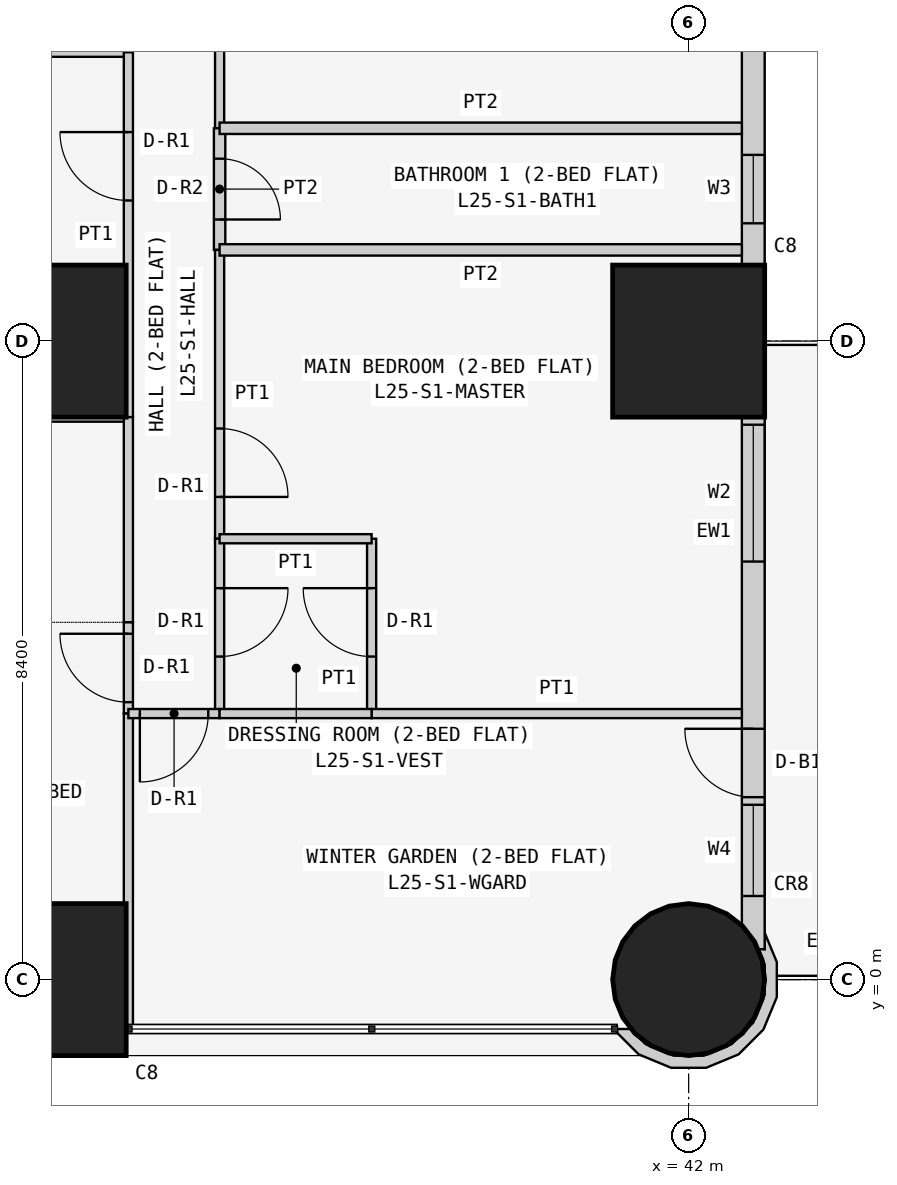
"""IFC4 building model, lengths in metres.
Left out: names, types, materials, properties, quantities, classifications, styles, units other than length and angle.
Written with IfcOpenShell. Run it as: python <this file> out.ifc"""

import sys

from ifc_helpers import new_model, si_unit, direction, frame, frame_2d, origin, origin_2d, place, context, subcontext, project, spatial, polyline, rectangle, circle, outline, extrude, element, fill, save


model = new_model("IFC4")
c1 = context("Model", 3, precision=1e-05, world=origin(), true_north=direction((0.0, 1.0)))
c2 = subcontext(c1, "Body", "Model", "MODEL_VIEW")
j1 = project(units=[si_unit("LENGTHUNIT", "METRE"), si_unit("PLANEANGLEUNIT", "RADIAN")], contexts=[c1])
p1 = place(None, origin())
s1 = spatial("IfcSite", under=j1, at=p1, CompositionType="ELEMENT")
p2 = place(p1, origin())
s2 = spatial("IfcBuilding", under=s1, at=p2, CompositionType="ELEMENT")
p3 = place(p2, frame((0.0, 0.0, 99.3)))
s3 = spatial("IfcBuildingStorey", under=s2, at=p3, CompositionType="ELEMENT", Elevation=99.3)
for number, where, z_axis, x_axis in (
    (1, (33.6, 0.0, 0.0), (0.0, 0.0, 1.0), (1.0, 0.0, 0.0)),
    (2, (33.6, 8.4, 0.0), (0.0, 0.0, 1.0), (1.0, 0.0, 0.0)),
):
    element("IfcColumn", number, at=place(p3, frame(where, z_axis=z_axis, x_axis=x_axis)), inside=s3, PredefinedType="COLUMN", context=c2, shape_type="SweptSolid", body=[
        extrude(rectangle(XDim=2.0, YDim=2.0, at=origin_2d()), origin(), (0.0, 0.0, 1.0), 3.6),
    ])
p4 = place(p3, frame((42.0, 0.0, 0.0), z_axis=(0.0, 0.0, 1.0), x_axis=(1.0, 0.0, 0.0)))
e3 = element("IfcColumn", 3, at=p4, inside=s3, PredefinedType="COLUMN", context=c2, shape_type="SweptSolid", body=[
    extrude(circle(Radius=1.0, at=origin_2d()), origin(), (0.0, 0.0, 1.0), 3.6),
])
p5 = place(p3, frame((42.0, 8.4, 0.0), z_axis=(0.0, 0.0, 1.0), x_axis=(1.0, 0.0, 0.0)))
e4 = element("IfcColumn", 4, at=p5, inside=s3, PredefinedType="COLUMN", context=c2, shape_type="SweptSolid", body=[
    extrude(rectangle(XDim=2.0, YDim=2.0, at=origin_2d()), origin(), (0.0, 0.0, 1.0), 3.6),
])
p6 = place(p3, frame((42.85, 0.4, 0.0), z_axis=(0.0, 0.0, 1.0), x_axis=(0.0, 1.0, 0.0)))
e5 = element("IfcWall", 5, at=p6, inside=s3, PredefinedType="SOLIDWALL", context=c2, shape_type="SweptSolid", body=[
    extrude(rectangle(XDim=15.7, YDim=0.3, at=frame_2d((7.85, 0.0))), origin(), (0.0, 0.0, 1.0), 3.35),
])
p7 = place(p6, frame((12.4, 0.0, 0.9)))
e6 = element("IfcOpeningElement", 6, at=p7, cuts=e5, PredefinedType="OPENING", context=c2, shape_type="SweptSolid", body=[
    extrude(rectangle(XDim=1.8, YDim=1.5, at=frame_2d((0.9, 0.75))), frame((0.0, 0.16, 0.0), z_axis=(0.0, -1.0, 0.0), x_axis=(1.0, 0.0, 0.0)), (0.0, 0.0, 1.0), 0.32),
])
p8 = place(p6, frame((9.55, 0.0, 1.5)))
e7 = element("IfcOpeningElement", 7, at=p8, cuts=e5, PredefinedType="OPENING", context=c2, shape_type="SweptSolid", body=[
    extrude(rectangle(XDim=0.9, YDim=0.7, at=frame_2d((0.45, 0.35))), frame((0.0, 0.16, 0.0), z_axis=(0.0, -1.0, 0.0), x_axis=(1.0, 0.0, 0.0)), (0.0, 0.0, 1.0), 0.32),
])
p9 = place(p6, frame((5.1, 0.0, 0.9)))
e8 = element("IfcOpeningElement", 8, at=p9, cuts=e5, PredefinedType="OPENING", context=c2, shape_type="SweptSolid", body=[
    extrude(rectangle(XDim=1.8, YDim=1.5, at=frame_2d((0.9, 0.75))), frame((0.0, 0.16, 0.0), z_axis=(0.0, -1.0, 0.0), x_axis=(1.0, 0.0, 0.0)), (0.0, 0.0, 1.0), 0.32),
])
p10 = place(p6, frame((2.0, 0.0, 0.0)))
e9 = element("IfcOpeningElement", 9, at=p10, cuts=e5, PredefinedType="OPENING", context=c2, shape_type="SweptSolid", body=[
    extrude(rectangle(XDim=0.9, YDim=2.4, at=frame_2d((0.45, 1.2))), frame((0.0, 0.16, 0.0), z_axis=(0.0, -1.0, 0.0), x_axis=(1.0, 0.0, 0.0)), (0.0, 0.0, 1.0), 0.32),
])
p11 = place(p6, frame((0.7, 0.0, 0.9)))
e10 = element("IfcOpeningElement", 10, at=p11, cuts=e5, PredefinedType="OPENING", context=c2, shape_type="SweptSolid", body=[
    extrude(rectangle(XDim=1.2, YDim=1.5, at=frame_2d((0.6, 0.75))), frame((0.0, 0.16, 0.0), z_axis=(0.0, -1.0, 0.0), x_axis=(1.0, 0.0, 0.0)), (0.0, 0.0, 1.0), 0.32),
])
p12 = place(p3, frame((41.132, -0.643, 0.0), z_axis=(0.0, 0.0, 1.0), x_axis=(0.555974394895, -0.831199417842, 0.0)))
e11 = element("IfcWall", 11, at=p12, inside=s3, PredefinedType="SOLIDWALL", context=c2, shape_type="SweptSolid", body=[
    extrude(outline(polyline([(0.171, 2.132), (0.113, 2.066), (0.339, 2.022), (0.67, 1.8), (0.891, 1.469), (0.968, 1.078), (0.89, 0.688), (0.669, 0.357), (0.338, 0.136), (0.062, 0.081), (-0.036, -0.066), (0.005, -0.093), (0.4, -0.014), (0.783, 0.242), (1.04, 0.626), (1.13, 1.078), (1.04, 1.531), (0.784, 1.915), (0.401, 2.171), (-0.009, 2.253), (0.171, 2.132)])), origin(), (0.0, 0.0, 1.0), 3.35),
])
for number, where, z_axis, x_axis in (
    (12, (29.4, 12.2, 0.0), (0.0, 0.0, 1.0), (1.0, 0.0, 0.0)),
    (13, (29.4, 7.4, 0.0), (0.0, 0.0, 1.0), (1.0, 0.0, 0.0)),
):
    element("IfcWall", number, at=place(p3, frame(where, z_axis=z_axis, x_axis=x_axis)), inside=s3, PredefinedType="PARTITIONING", context=c2, shape_type="SweptSolid", body=[
        extrude(rectangle(XDim=5.229, YDim=0.12, at=frame_2d((2.615, 0.0))), origin(), (0.0, 0.0, 1.0), 3.35),
    ])
p13 = place(p3, frame((34.629, 7.4, 0.0), z_axis=(0.0, 0.0, 1.0), x_axis=(0.0, 1.0, 0.0)))
e14 = element("IfcWall", 14, at=p13, inside=s3, PredefinedType="PARTITIONING", context=c2, shape_type="SweptSolid", body=[
    extrude(rectangle(XDim=4.8, YDim=0.12, at=frame_2d((2.4, 0.0))), origin(), (0.0, 0.0, 1.0), 3.35),
])
p14 = place(p13, frame((2.85, 0.0, 0.0)))
e15 = element("IfcOpeningElement", 15, at=p14, cuts=e14, PredefinedType="OPENING", context=c2, shape_type="SweptSolid", body=[
    extrude(rectangle(XDim=0.9, YDim=2.1, at=frame_2d((0.45, 1.05))), frame((0.0, 0.07, 0.0), z_axis=(0.0, -1.0, 0.0), x_axis=(1.0, 0.0, 0.0)), (0.0, 0.0, 1.0), 0.14),
])
p15 = place(p3, frame((34.629, 4.7, 0.0), z_axis=(0.0, 0.0, 1.0), x_axis=(0.0, 1.0, 0.0)))
e16 = element("IfcWall", 16, at=p15, inside=s3, PredefinedType="PARTITIONING", context=c2, shape_type="SweptSolid", body=[
    extrude(rectangle(XDim=2.7, YDim=0.12, at=frame_2d((1.35, 0.0))), origin(), (0.0, 0.0, 1.0), 3.35),
])
p16 = place(p3, frame((34.629, 3.5, 0.0), z_axis=(0.0, 0.0, 1.0), x_axis=(0.0, 1.0, 0.0)))
e17 = element("IfcWall", 17, at=p16, inside=s3, PredefinedType="PARTITIONING", context=c2, shape_type="SweptSolid", body=[
    extrude(rectangle(XDim=1.2, YDim=0.12, at=frame_2d((0.6, 0.0))), origin(), (0.0, 0.0, 1.0), 3.35),
])
p17 = place(p16, frame((0.15, 0.0, 0.0)))
e18 = element("IfcOpeningElement", 18, at=p17, cuts=e17, PredefinedType="OPENING", context=c2, shape_type="SweptSolid", body=[
    extrude(rectangle(XDim=0.9, YDim=2.1, at=frame_2d((0.45, 1.05))), frame((0.0, 0.07, 0.0), z_axis=(0.0, -1.0, 0.0), x_axis=(1.0, 0.0, 0.0)), (0.0, 0.0, 1.0), 0.14),
])
p18 = place(p3, frame((34.629, -0.65, 0.0), z_axis=(0.0, 0.0, 1.0), x_axis=(0.0, 1.0, 0.0)))
e19 = element("IfcWall", 19, at=p18, inside=s3, PredefinedType="PARTITIONING", context=c2, shape_type="SweptSolid", body=[
    extrude(rectangle(XDim=4.15, YDim=0.12, at=frame_2d((2.075, 0.0))), origin(), (0.0, 0.0, 1.0), 3.35),
])
p19 = place(p3, frame((35.829, 11.2, 0.0), z_axis=(0.0, 0.0, 1.0), x_axis=(0.0, 1.0, 0.0)))
e20 = element("IfcWall", 20, at=p19, inside=s3, PredefinedType="PARTITIONING", context=c2, shape_type="SweptSolid", body=[
    extrude(rectangle(XDim=4.475, YDim=0.12, at=frame_2d((2.238, 0.0))), origin(), (0.0, 0.0, 1.0), 3.35),
])
p20 = place(p19, frame((1.85, 0.0, 0.0)))
e21 = element("IfcOpeningElement", 21, at=p20, cuts=e20, PredefinedType="OPENING", context=c2, shape_type="SweptSolid", body=[
    extrude(rectangle(XDim=0.9, YDim=2.1, at=frame_2d((0.45, 1.05))), frame((0.0, 0.07, 0.0), z_axis=(0.0, -1.0, 0.0), x_axis=(1.0, 0.0, 0.0)), (0.0, 0.0, 1.0), 0.14),
])
p21 = place(p3, frame((35.829, 9.6, 0.0), z_axis=(0.0, 0.0, 1.0), x_axis=(0.0, 1.0, 0.0)))
e22 = element("IfcWall", 22, at=p21, inside=s3, PredefinedType="PARTITIONING", context=c2, shape_type="SweptSolid", body=[
    extrude(rectangle(XDim=1.6, YDim=0.15, at=frame_2d((0.8, 0.0))), origin(), (0.0, 0.0, 1.0), 3.35),
])
p22 = place(p21, frame((0.4, 0.0, 0.0)))
e23 = element("IfcOpeningElement", 23, at=p22, cuts=e22, PredefinedType="OPENING", context=c2, shape_type="SweptSolid", body=[
    extrude(rectangle(XDim=0.8, YDim=2.1, at=frame_2d((0.4, 1.05))), frame((0.0, 0.085, 0.0), z_axis=(0.0, -1.0, 0.0), x_axis=(1.0, 0.0, 0.0)), (0.0, 0.0, 1.0), 0.17),
])
p23 = place(p3, frame((35.829, 5.8, 0.0), z_axis=(0.0, 0.0, 1.0), x_axis=(0.0, 1.0, 0.0)))
e24 = element("IfcWall", 24, at=p23, inside=s3, PredefinedType="PARTITIONING", context=c2, shape_type="SweptSolid", body=[
    extrude(rectangle(XDim=3.8, YDim=0.12, at=frame_2d((1.9, 0.0))), origin(), (0.0, 0.0, 1.0), 3.35),
])
p24 = place(p23, frame((0.55, 0.0, 0.0)))
e25 = element("IfcOpeningElement", 25, at=p24, cuts=e24, PredefinedType="OPENING", context=c2, shape_type="SweptSolid", body=[
    extrude(rectangle(XDim=0.9, YDim=2.1, at=frame_2d((0.45, 1.05))), frame((0.0, 0.07, 0.0), z_axis=(0.0, -1.0, 0.0), x_axis=(1.0, 0.0, 0.0)), (0.0, 0.0, 1.0), 0.14),
])
p25 = place(p3, frame((35.829, 3.5, 0.0), z_axis=(0.0, 0.0, 1.0), x_axis=(0.0, 1.0, 0.0)))
e26 = element("IfcWall", 26, at=p25, inside=s3, PredefinedType="PARTITIONING", context=c2, shape_type="SweptSolid", body=[
    extrude(rectangle(XDim=2.3, YDim=0.12, at=frame_2d((1.15, 0.0))), origin(), (0.0, 0.0, 1.0), 3.35),
])
p26 = place(p25, frame((0.75, 0.0, 0.0)))
e27 = element("IfcOpeningElement", 27, at=p26, cuts=e26, PredefinedType="OPENING", context=c2, shape_type="SweptSolid", body=[
    extrude(rectangle(XDim=0.9, YDim=2.1, at=frame_2d((0.45, 1.05))), frame((0.0, 0.07, 0.0), z_axis=(0.0, -1.0, 0.0), x_axis=(1.0, 0.0, 0.0)), (0.0, 0.0, 1.0), 0.14),
])
p27 = place(p3, frame((34.629, 3.5, 0.0), z_axis=(0.0, 0.0, 1.0), x_axis=(1.0, 0.0, 0.0)))
e28 = element("IfcWall", 28, at=p27, inside=s3, PredefinedType="PARTITIONING", context=c2, shape_type="SweptSolid", body=[
    extrude(rectangle(XDim=1.2, YDim=0.12, at=frame_2d((0.6, 0.0))), origin(), (0.0, 0.0, 1.0), 3.35),
])
p28 = place(p27, frame((0.151, 0.0, 0.0)))
e29 = element("IfcOpeningElement", 29, at=p28, cuts=e28, PredefinedType="OPENING", context=c2, shape_type="SweptSolid", body=[
    extrude(rectangle(XDim=0.9, YDim=2.1, at=frame_2d((0.45, 1.05))), frame((0.0, 0.07, 0.0), z_axis=(0.0, -1.0, 0.0), x_axis=(1.0, 0.0, 0.0)), (0.0, 0.0, 1.0), 0.14),
])
for number, where, z_axis, x_axis in (
    (30, (35.829, 11.2, 0.0), (0.0, 0.0, 1.0), (1.0, 0.0, 0.0)),
    (31, (35.829, 9.6, 0.0), (0.0, 0.0, 1.0), (1.0, 0.0, 0.0)),
):
    element("IfcWall", number, at=place(p3, frame(where, z_axis=z_axis, x_axis=x_axis)), inside=s3, PredefinedType="PARTITIONING", context=c2, shape_type="SweptSolid", body=[
        extrude(rectangle(XDim=6.871, YDim=0.15, at=frame_2d((3.436, 0.0))), origin(), (0.0, 0.0, 1.0), 3.35),
    ])
p29 = place(p3, frame((37.829, 3.5, 0.0), z_axis=(0.0, 0.0, 1.0), x_axis=(0.0, 1.0, 0.0)))
e32 = element("IfcWall", 32, at=p29, inside=s3, PredefinedType="PARTITIONING", context=c2, shape_type="SweptSolid", body=[
    extrude(rectangle(XDim=2.3, YDim=0.12, at=frame_2d((1.15, 0.0))), origin(), (0.0, 0.0, 1.0), 2.667),
])
p30 = place(p29, frame((0.75, 0.0, 0.0)))
e33 = element("IfcOpeningElement", 33, at=p30, cuts=e32, PredefinedType="OPENING", context=c2, shape_type="SweptSolid", body=[
    extrude(rectangle(XDim=0.9, YDim=2.1, at=frame_2d((0.45, 1.05))), frame((0.0, 0.07, 0.0), z_axis=(0.0, -1.0, 0.0), x_axis=(1.0, 0.0, 0.0)), (0.0, 0.0, 1.0), 0.14),
])
p31 = place(p3, frame((37.829, 5.8, 0.0), z_axis=(0.0, 0.0, 1.0), x_axis=(-1.0, 0.0, 0.0)))
e34 = element("IfcWall", 34, at=p31, inside=s3, PredefinedType="PARTITIONING", context=c2, shape_type="SweptSolid", body=[
    extrude(rectangle(XDim=2.0, YDim=0.12, at=frame_2d((1.0, 0.0))), origin(), (0.0, 0.0, 1.0), 3.35),
])
p32 = place(p3, frame((42.7, 3.5, 0.0), z_axis=(0.0, 0.0, 1.0), x_axis=(-1.0, 0.0, 0.0)))
e35 = element("IfcWall", 35, at=p32, inside=s3, PredefinedType="PARTITIONING", context=c2, shape_type="SweptSolid", body=[
    extrude(rectangle(XDim=4.871, YDim=0.12, at=frame_2d((2.436, 0.0))), origin(), (0.0, 0.0, 1.0), 3.35),
])
p33 = place(p3, frame((35.829, 3.5, 0.0), z_axis=(0.0, 0.0, 1.0), x_axis=(1.0, 0.0, 0.0)))
e36 = element("IfcWall", 36, at=p33, inside=s3, PredefinedType="PARTITIONING", context=c2, shape_type="SweptSolid", body=[
    extrude(rectangle(XDim=2.0, YDim=0.12, at=frame_2d((1.0, 0.0))), origin(), (0.0, 0.0, 1.0), 3.35),
])
p34 = place(p8, origin())
e37 = element("IfcWindow", 37, at=p34, inside=s3, PartitioningType="SINGLE_PANEL", PredefinedType="WINDOW", context=c2, shape_type="SweptSolid", body=[
    extrude(rectangle(XDim=0.9, YDim=0.7, at=frame_2d((0.45, 0.35))), frame((0.0, 0.03, 0.0), z_axis=(0.0, -1.0, 0.0), x_axis=(1.0, 0.0, 0.0)), (0.0, 0.0, 1.0), 0.06),
])
fill(e7, e37)
p35 = place(p9, origin())
e38 = element("IfcWindow", 38, at=p35, inside=s3, PartitioningType="SINGLE_PANEL", PredefinedType="WINDOW", context=c2, shape_type="SweptSolid", body=[
    extrude(rectangle(XDim=1.8, YDim=1.5, at=frame_2d((0.9, 0.75))), frame((0.0, 0.03, 0.0), z_axis=(0.0, -1.0, 0.0), x_axis=(1.0, 0.0, 0.0)), (0.0, 0.0, 1.0), 0.06),
])
fill(e8, e38)
p36 = place(p10, origin())
e39 = element("IfcDoor", 39, at=p36, inside=s3, OperationType="SINGLE_SWING_RIGHT", PredefinedType="DOOR", context=c2, shape_type="SweptSolid", body=[
    extrude(rectangle(XDim=0.9, YDim=2.4, at=frame_2d((0.45, 1.2))), frame((0.0, 0.025, 0.0), z_axis=(0.0, -1.0, 0.0), x_axis=(1.0, 0.0, 0.0)), (0.0, 0.0, 1.0), 0.05),
])
fill(e9, e39)
p37 = place(p11, origin())
e40 = element("IfcWindow", 40, at=p37, inside=s3, PartitioningType="SINGLE_PANEL", PredefinedType="WINDOW", context=c2, shape_type="SweptSolid", body=[
    extrude(rectangle(XDim=1.2, YDim=1.5, at=frame_2d((0.6, 0.75))), frame((0.0, 0.03, 0.0), z_axis=(0.0, -1.0, 0.0), x_axis=(1.0, 0.0, 0.0)), (0.0, 0.0, 1.0), 0.06),
])
fill(e10, e40)
p38 = place(p14, origin())
e41 = element("IfcDoor", 41, at=p38, inside=s3, OperationType="SINGLE_SWING_RIGHT", PredefinedType="DOOR", context=c2, shape_type="SweptSolid", body=[
    extrude(rectangle(XDim=0.9, YDim=2.1, at=frame_2d((0.45, 1.05))), frame((0.0, 0.025, 0.0), z_axis=(0.0, -1.0, 0.0), x_axis=(1.0, 0.0, 0.0)), (0.0, 0.0, 1.0), 0.05),
])
fill(e15, e41)
p39 = place(p17, origin())
e42 = element("IfcDoor", 42, at=p39, inside=s3, OperationType="SINGLE_SWING_RIGHT", PredefinedType="DOOR", context=c2, shape_type="SweptSolid", body=[
    extrude(rectangle(XDim=0.9, YDim=2.1, at=frame_2d((0.45, 1.05))), frame((0.0, 0.025, 0.0), z_axis=(0.0, -1.0, 0.0), x_axis=(1.0, 0.0, 0.0)), (0.0, 0.0, 1.0), 0.05),
])
fill(e18, e42)
p40 = place(p22, frame((0.8, 0.0, 0.0), z_axis=(0.0, 0.0, 1.0), x_axis=(-1.0, 0.0, 0.0)))
e43 = element("IfcDoor", 43, at=p40, inside=s3, OperationType="SINGLE_SWING_RIGHT", PredefinedType="DOOR", context=c2, shape_type="SweptSolid", body=[
    extrude(rectangle(XDim=0.8, YDim=2.1, at=frame_2d((0.4, 1.05))), frame((0.0, 0.025, 0.0), z_axis=(0.0, -1.0, 0.0), x_axis=(1.0, 0.0, 0.0)), (0.0, 0.0, 1.0), 0.05),
])
fill(e23, e43)
p41 = place(p24, frame((0.9, 0.0, 0.0), z_axis=(0.0, 0.0, 1.0), x_axis=(-1.0, 0.0, 0.0)))
e44 = element("IfcDoor", 44, at=p41, inside=s3, OperationType="SINGLE_SWING_RIGHT", PredefinedType="DOOR", context=c2, shape_type="SweptSolid", body=[
    extrude(rectangle(XDim=0.9, YDim=2.1, at=frame_2d((0.45, 1.05))), frame((0.0, 0.025, 0.0), z_axis=(0.0, -1.0, 0.0), x_axis=(1.0, 0.0, 0.0)), (0.0, 0.0, 1.0), 0.05),
])
fill(e25, e44)
p42 = place(p26, frame((0.9, 0.0, 0.0), z_axis=(0.0, 0.0, 1.0), x_axis=(-1.0, 0.0, 0.0)))
e45 = element("IfcDoor", 45, at=p42, inside=s3, OperationType="SINGLE_SWING_LEFT", PredefinedType="DOOR", context=c2, shape_type="SweptSolid", body=[
    extrude(rectangle(XDim=0.9, YDim=2.1, at=frame_2d((0.45, 1.05))), frame((0.0, 0.025, 0.0), z_axis=(0.0, -1.0, 0.0), x_axis=(1.0, 0.0, 0.0)), (0.0, 0.0, 1.0), 0.05),
])
fill(e27, e45)
p43 = place(p30, origin())
e46 = element("IfcDoor", 46, at=p43, inside=s3, OperationType="SINGLE_SWING_RIGHT", PredefinedType="DOOR", context=c2, shape_type="SweptSolid", body=[
    extrude(rectangle(XDim=0.9, YDim=2.1, at=frame_2d((0.45, 1.05))), frame((0.0, 0.025, 0.0), z_axis=(0.0, -1.0, 0.0), x_axis=(1.0, 0.0, 0.0)), (0.0, 0.0, 1.0), 0.05),
])
fill(e33, e46)
p44 = place(p28, frame((0.9, 0.0, 0.0), z_axis=(0.0, 0.0, 1.0), x_axis=(-1.0, 0.0, 0.0)))
e47 = element("IfcDoor", 47, at=p44, inside=s3, OperationType="SINGLE_SWING_RIGHT", PredefinedType="DOOR", context=c2, shape_type="SweptSolid", body=[
    extrude(rectangle(XDim=0.9, YDim=2.1, at=frame_2d((0.45, 1.05))), frame((0.0, 0.025, 0.0), z_axis=(0.0, -1.0, 0.0), x_axis=(1.0, 0.0, 0.0)), (0.0, 0.0, 1.0), 0.05),
])
fill(e29, e47)
save(model, sys.argv[1])
